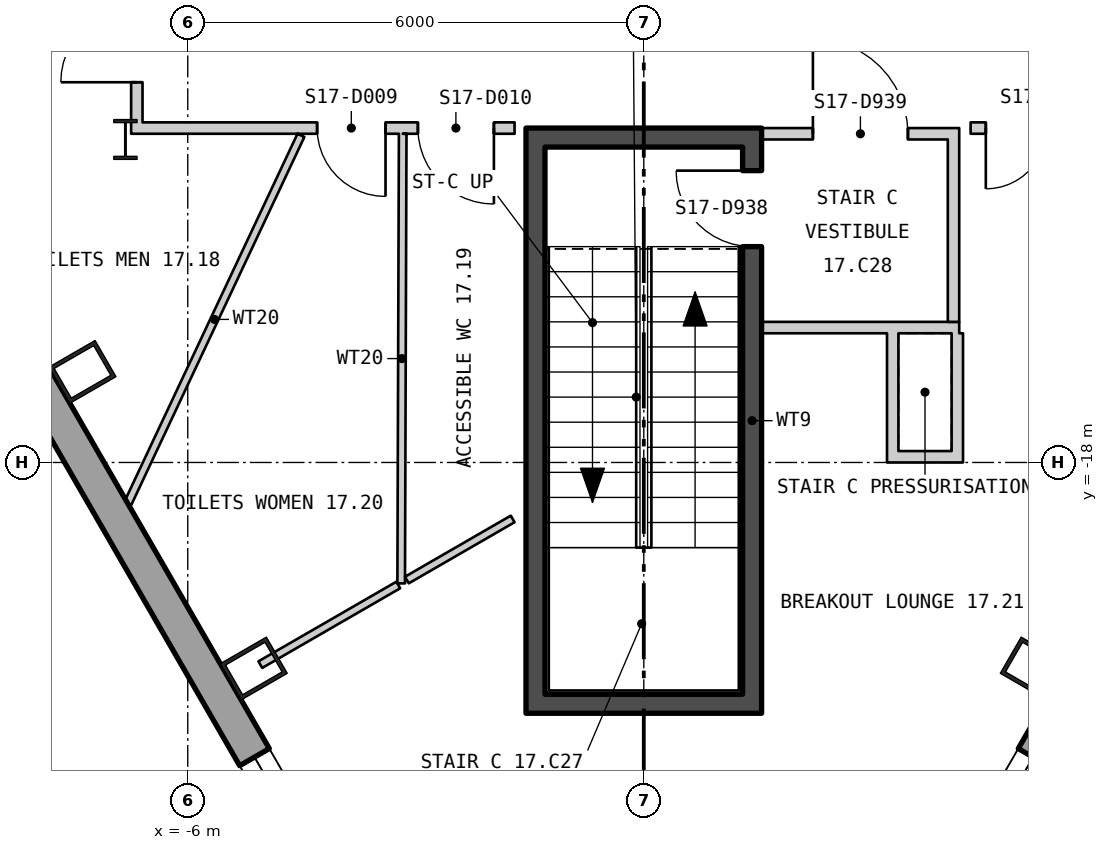
"""IFC4 building model, lengths in metres.
Left out: names, types, materials, properties, quantities, classifications, styles, units other than length and angle.
Written with IfcOpenShell. Run it as: python <this file> out.ifc"""

import sys

from ifc_helpers import new_model, si_unit, direction, frame, frame_2d, origin, origin_2d, place, context, subcontext, project, spatial, polyline, rectangle, hollow_rectangle, i_section, outline, extrude, element, fill, save


model = new_model("IFC4")
c1 = context("Model", 3, precision=1e-05, world=origin(), true_north=direction((0.0, 1.0)))
c2 = subcontext(c1, "Body", "Model", "MODEL_VIEW")
j1 = project(units=[si_unit("LENGTHUNIT", "METRE"), si_unit("PLANEANGLEUNIT", "RADIAN")], contexts=[c1])
p1 = place(None, origin())
s1 = spatial("IfcSite", under=j1, at=p1, CompositionType="ELEMENT")
p2 = place(p1, origin())
s2 = spatial("IfcBuilding", under=s1, at=p2, CompositionType="ELEMENT")
p3 = place(p2, frame((0.0, 0.0, 227.7)))
s3 = spatial("IfcBuildingStorey", under=s2, at=p3, CompositionType="ELEMENT", Elevation=227.7)
for number, where, z_axis, x_axis in (
    (1, (-7.385, -16.808, 0.0), (0.0, 0.0, 1.0), (0.5, -0.866, 0.0)),
    (2, (-5.131, -20.711, 0.0), (0.0, 0.0, 1.0), (0.5, -0.866, 0.0)),
    (3, (5.131, -20.711, 0.0), (0.0, 0.0, 1.0), (0.5, 0.866, 0.0)),
):
    element("IfcColumn", number, at=place(p3, frame(where, z_axis=z_axis, x_axis=x_axis)), inside=s3, PredefinedType="COLUMN", context=c2, shape_type="SweptSolid", body=[
        extrude(hollow_rectangle(XDim=0.55, YDim=0.7, WallThickness=0.05, at=origin_2d()), origin(), (0.0, 0.0, 1.0), 3.9),
    ])
p4 = place(p3, frame((-6.82, -13.75, 0.0), z_axis=(0.0, 0.0, 1.0), x_axis=(1.0, 0.0, 0.0)))
e4 = element("IfcColumn", 4, at=p4, inside=s3, PredefinedType="COLUMN", context=c2, shape_type="SweptSolid", body=[
    extrude(i_section(OverallWidth=0.306, OverallDepth=0.524, WebThickness=0.021, FlangeThickness=0.04, at=origin_2d()), origin(), (0.0, 0.0, 1.0), 3.9),
])
p5 = place(p3, frame((-26.075, 14.415, -0.18), z_axis=(0.0, 0.0, 1.0), x_axis=(0.499999194392, -0.866025868902, 0.0)))
e5 = element("IfcWall", 5, at=p5, inside=s3, PredefinedType="SOLIDWALL", context=c2, shape_type="SweptSolid", body=[
    extrude(outline(polyline([(-0.13, -0.225), (45.86, -0.225), (45.6, 0.225), (0.13, 0.225), (-0.13, -0.225)])), origin(), (0.0, 0.0, 1.0), 3.68),
])
p6 = place(p5, frame((1.424, 0.0, 1.08)))
e6 = element("IfcOpeningElement", 6, at=p6, cuts=e5, PredefinedType="OPENING", context=c2, shape_type="SweptSolid", body=[
    extrude(rectangle(XDim=2.4, YDim=2.0, at=frame_2d((1.2, 1.0))), frame((0.0, 0.235, 0.0), z_axis=(0.0, -1.0, 0.0), x_axis=(1.0, 0.0, 0.0)), (0.0, 0.0, 1.0), 0.47),
])
p7 = place(p5, frame((5.892, 0.0, 1.08)))
e7 = element("IfcOpeningElement", 7, at=p7, cuts=e5, PredefinedType="OPENING", context=c2, shape_type="SweptSolid", body=[
    extrude(rectangle(XDim=2.4, YDim=2.0, at=frame_2d((1.2, 1.0))), frame((0.0, 0.235, 0.0), z_axis=(0.0, -1.0, 0.0), x_axis=(1.0, 0.0, 0.0)), (0.0, 0.0, 1.0), 0.47),
])
p8 = place(p5, frame((10.399, 0.0, 1.08)))
e8 = element("IfcOpeningElement", 8, at=p8, cuts=e5, PredefinedType="OPENING", context=c2, shape_type="SweptSolid", body=[
    extrude(rectangle(XDim=2.4, YDim=2.0, at=frame_2d((1.2, 1.0))), frame((0.0, 0.235, 0.0), z_axis=(0.0, -1.0, 0.0), x_axis=(1.0, 0.0, 0.0)), (0.0, 0.0, 1.0), 0.47),
])
p9 = place(p5, frame((19.412, 0.0, 1.08)))
e9 = element("IfcOpeningElement", 9, at=p9, cuts=e5, PredefinedType="OPENING", context=c2, shape_type="SweptSolid", body=[
    extrude(rectangle(XDim=2.4, YDim=2.0, at=frame_2d((1.2, 1.0))), frame((0.0, 0.235, 0.0), z_axis=(0.0, -1.0, 0.0), x_axis=(1.0, 0.0, 0.0)), (0.0, 0.0, 1.0), 0.47),
])
p10 = place(p5, frame((23.918, 0.0, 1.08)))
e10 = element("IfcOpeningElement", 10, at=p10, cuts=e5, PredefinedType="OPENING", context=c2, shape_type="SweptSolid", body=[
    extrude(rectangle(XDim=2.4, YDim=2.0, at=frame_2d((1.2, 1.0))), frame((0.0, 0.235, 0.0), z_axis=(0.0, -1.0, 0.0), x_axis=(1.0, 0.0, 0.0)), (0.0, 0.0, 1.0), 0.47),
])
p11 = place(p5, frame((28.425, 0.0, 1.08)))
e11 = element("IfcOpeningElement", 11, at=p11, cuts=e5, PredefinedType="OPENING", context=c2, shape_type="SweptSolid", body=[
    extrude(rectangle(XDim=2.4, YDim=2.0, at=frame_2d((1.2, 1.0))), frame((0.0, 0.235, 0.0), z_axis=(0.0, -1.0, 0.0), x_axis=(1.0, 0.0, 0.0)), (0.0, 0.0, 1.0), 0.47),
])
p12 = place(p5, frame((32.932, 0.0, 1.08)))
e12 = element("IfcOpeningElement", 12, at=p12, cuts=e5, PredefinedType="OPENING", context=c2, shape_type="SweptSolid", body=[
    extrude(rectangle(XDim=2.4, YDim=2.0, at=frame_2d((1.2, 1.0))), frame((0.0, 0.235, 0.0), z_axis=(0.0, -1.0, 0.0), x_axis=(1.0, 0.0, 0.0)), (0.0, 0.0, 1.0), 0.47),
])
p13 = place(p5, frame((41.907, 0.0, 1.08)))
e13 = element("IfcOpeningElement", 13, at=p13, cuts=e5, PredefinedType="OPENING", context=c2, shape_type="SweptSolid", body=[
    extrude(rectangle(XDim=2.4, YDim=2.0, at=frame_2d((1.2, 1.0))), frame((0.0, 0.235, 0.0), z_axis=(0.0, -1.0, 0.0), x_axis=(1.0, 0.0, 0.0)), (0.0, 0.0, 1.0), 0.47),
])
p14 = place(p3, frame((3.21, -25.189, -0.18), z_axis=(0.0, 0.0, 1.0), x_axis=(0.499999194392, 0.866025868902, 0.0)))
e14 = element("IfcWall", 14, at=p14, inside=s3, PredefinedType="SOLIDWALL", context=c2, shape_type="SweptSolid", body=[
    extrude(outline(polyline([(-0.13, -0.225), (45.86, -0.225), (45.6, 0.225), (0.13, 0.225), (-0.13, -0.225)])), origin(), (0.0, 0.0, 1.0), 3.68),
])
p15 = place(p14, frame((1.424, 0.0, 1.08)))
e15 = element("IfcOpeningElement", 15, at=p15, cuts=e14, PredefinedType="OPENING", context=c2, shape_type="SweptSolid", body=[
    extrude(rectangle(XDim=2.4, YDim=2.0, at=frame_2d((1.2, 1.0))), frame((0.0, 0.235, 0.0), z_axis=(0.0, -1.0, 0.0), x_axis=(1.0, 0.0, 0.0)), (0.0, 0.0, 1.0), 0.47),
])
p16 = place(p14, frame((5.892, 0.0, 1.08)))
e16 = element("IfcOpeningElement", 16, at=p16, cuts=e14, PredefinedType="OPENING", context=c2, shape_type="SweptSolid", body=[
    extrude(rectangle(XDim=2.4, YDim=2.0, at=frame_2d((1.2, 1.0))), frame((0.0, 0.235, 0.0), z_axis=(0.0, -1.0, 0.0), x_axis=(1.0, 0.0, 0.0)), (0.0, 0.0, 1.0), 0.47),
])
p17 = place(p14, frame((10.399, 0.0, 1.08)))
e17 = element("IfcOpeningElement", 17, at=p17, cuts=e14, PredefinedType="OPENING", context=c2, shape_type="SweptSolid", body=[
    extrude(rectangle(XDim=2.4, YDim=2.0, at=frame_2d((1.2, 1.0))), frame((0.0, 0.235, 0.0), z_axis=(0.0, -1.0, 0.0), x_axis=(1.0, 0.0, 0.0)), (0.0, 0.0, 1.0), 0.47),
])
p18 = place(p14, frame((14.905, 0.0, 1.08)))
e18 = element("IfcOpeningElement", 18, at=p18, cuts=e14, PredefinedType="OPENING", context=c2, shape_type="SweptSolid", body=[
    extrude(rectangle(XDim=2.4, YDim=2.0, at=frame_2d((1.2, 1.0))), frame((0.0, 0.235, 0.0), z_axis=(0.0, -1.0, 0.0), x_axis=(1.0, 0.0, 0.0)), (0.0, 0.0, 1.0), 0.47),
])
p19 = place(p14, frame((19.412, 0.0, 1.08)))
e19 = element("IfcOpeningElement", 19, at=p19, cuts=e14, PredefinedType="OPENING", context=c2, shape_type="SweptSolid", body=[
    extrude(rectangle(XDim=2.4, YDim=2.0, at=frame_2d((1.2, 1.0))), frame((0.0, 0.235, 0.0), z_axis=(0.0, -1.0, 0.0), x_axis=(1.0, 0.0, 0.0)), (0.0, 0.0, 1.0), 0.47),
])
p20 = place(p14, frame((23.918, 0.0, 1.08)))
e20 = element("IfcOpeningElement", 20, at=p20, cuts=e14, PredefinedType="OPENING", context=c2, shape_type="SweptSolid", body=[
    extrude(rectangle(XDim=2.4, YDim=2.0, at=frame_2d((1.2, 1.0))), frame((0.0, 0.235, 0.0), z_axis=(0.0, -1.0, 0.0), x_axis=(1.0, 0.0, 0.0)), (0.0, 0.0, 1.0), 0.47),
])
p21 = place(p14, frame((32.932, 0.0, 1.08)))
e21 = element("IfcOpeningElement", 21, at=p21, cuts=e14, PredefinedType="OPENING", context=c2, shape_type="SweptSolid", body=[
    extrude(rectangle(XDim=2.4, YDim=2.0, at=frame_2d((1.2, 1.0))), frame((0.0, 0.235, 0.0), z_axis=(0.0, -1.0, 0.0), x_axis=(1.0, 0.0, 0.0)), (0.0, 0.0, 1.0), 0.47),
])
p22 = place(p14, frame((37.438, 0.0, 1.08)))
e22 = element("IfcOpeningElement", 22, at=p22, cuts=e14, PredefinedType="OPENING", context=c2, shape_type="SweptSolid", body=[
    extrude(rectangle(XDim=2.4, YDim=2.0, at=frame_2d((1.2, 1.0))), frame((0.0, 0.235, 0.0), z_axis=(0.0, -1.0, 0.0), x_axis=(1.0, 0.0, 0.0)), (0.0, 0.0, 1.0), 0.47),
])
p23 = place(p14, frame((41.907, 0.0, 1.08)))
e23 = element("IfcOpeningElement", 23, at=p23, cuts=e14, PredefinedType="OPENING", context=c2, shape_type="SweptSolid", body=[
    extrude(rectangle(XDim=2.4, YDim=2.0, at=frame_2d((1.2, 1.0))), frame((0.0, 0.235, 0.0), z_axis=(0.0, -1.0, 0.0), x_axis=(1.0, 0.0, 0.0)), (0.0, 0.0, 1.0), 0.47),
])
p24 = place(p3, frame((-1.425, -21.05, 0.0), z_axis=(0.0, 0.0, 1.0), x_axis=(0.0, 1.0, 0.0)))
e24 = element("IfcWall", 24, at=p24, inside=s3, PredefinedType="SHEAR", context=c2, shape_type="SweptSolid", body=[
    extrude(rectangle(XDim=7.2, YDim=0.25, at=frame_2d((3.6, 0.0))), origin(), (0.0, 0.0, 1.0), 3.7),
])
p25 = place(p3, frame((1.425, -21.05, 0.0), z_axis=(0.0, 0.0, 1.0), x_axis=(0.0, 1.0, 0.0)))
e25 = element("IfcWall", 25, at=p25, inside=s3, PredefinedType="SHEAR", context=c2, shape_type="SweptSolid", body=[
    extrude(rectangle(XDim=7.2, YDim=0.25, at=frame_2d((3.6, 0.0))), origin(), (0.0, 0.0, 1.0), 3.7),
])
p26 = place(p25, frame((5.89, 0.0, 0.0)))
e26 = element("IfcOpeningElement", 26, at=p26, cuts=e25, PredefinedType="OPENING", context=c2, shape_type="SweptSolid", body=[
    extrude(rectangle(XDim=1.0, YDim=2.1, at=frame_2d((0.5, 1.05))), frame((0.0, 0.135, 0.0), z_axis=(0.0, -1.0, 0.0), x_axis=(1.0, 0.0, 0.0)), (0.0, 0.0, 1.0), 0.27),
])
for number, where, z_axis, x_axis in (
    (27, (-1.55, -21.175, 0.0), (0.0, 0.0, 1.0), (1.0, 0.0, 0.0)),
    (28, (-1.55, -13.725, 0.0), (0.0, 0.0, 1.0), (1.0, 0.0, 0.0)),
):
    element("IfcWall", number, at=place(p3, frame(where, z_axis=z_axis, x_axis=x_axis)), inside=s3, PredefinedType="SHEAR", context=c2, shape_type="SweptSolid", body=[
        extrude(rectangle(XDim=3.1, YDim=0.25, at=frame_2d((1.55, 0.0))), origin(), (0.0, 0.0, 1.0), 3.7),
    ])
p27 = place(p3, frame((1.55, -16.225, 0.0), z_axis=(0.0, 0.0, 1.0), x_axis=(1.0, 0.0, 0.0)))
e29 = element("IfcWall", 29, at=p27, inside=s3, PredefinedType="PARTITIONING", context=c2, shape_type="SweptSolid", body=[
    extrude(rectangle(XDim=2.6, YDim=0.15, at=frame_2d((1.3, 0.0))), origin(), (0.0, 0.0, 1.0), 3.7),
])
p28 = place(p3, frame((4.075, -16.15, 0.0), z_axis=(0.0, 0.0, 1.0), x_axis=(0.0, 1.0, 0.0)))
e30 = element("IfcWall", 30, at=p28, inside=s3, PredefinedType="PARTITIONING", context=c2, shape_type="SweptSolid", body=[
    extrude(rectangle(XDim=2.4, YDim=0.15, at=frame_2d((1.2, 0.0))), origin(), (0.0, 0.0, 1.0), 3.7),
])
p29 = place(p3, frame((1.55, -13.675, 0.0), z_axis=(0.0, 0.0, 1.0), x_axis=(1.0, 0.0, 0.0)))
e31 = element("IfcWall", 31, at=p29, inside=s3, PredefinedType="PARTITIONING", context=c2, shape_type="SweptSolid", body=[
    extrude(rectangle(XDim=2.6, YDim=0.15, at=frame_2d((1.3, 0.0))), origin(), (0.0, 0.0, 1.0), 2.91),
])
p30 = place(p29, frame((0.675, 0.0, 0.0)))
e32 = element("IfcOpeningElement", 32, at=p30, cuts=e31, PredefinedType="OPENING", context=c2, shape_type="SweptSolid", body=[
    extrude(rectangle(XDim=1.25, YDim=2.1, at=frame_2d((0.625, 1.05))), frame((0.0, 0.085, 0.0), z_axis=(0.0, -1.0, 0.0), x_axis=(1.0, 0.0, 0.0)), (0.0, 0.0, 1.0), 0.17),
])
p31 = place(p3, frame((3.275, -18.0, 0.0), z_axis=(0.0, 0.0, 1.0), x_axis=(0.0, 1.0, 0.0)))
e33 = element("IfcWall", 33, at=p31, inside=s3, PredefinedType="PARTITIONING", context=c2, shape_type="SweptSolid", body=[
    extrude(rectangle(XDim=1.7, YDim=0.15, at=frame_2d((0.85, 0.0))), origin(), (0.0, 0.0, 1.0), 3.01),
])
p32 = place(p3, frame((3.35, -17.925, 0.0), z_axis=(0.0, 0.0, 1.0), x_axis=(1.0, 0.0, 0.0)))
e34 = element("IfcWall", 34, at=p32, inside=s3, PredefinedType="PARTITIONING", context=c2, shape_type="SweptSolid", body=[
    extrude(rectangle(XDim=0.7, YDim=0.15, at=frame_2d((0.35, 0.0))), origin(), (0.0, 0.0, 1.0), 3.7),
])
p33 = place(p3, frame((4.125, -18.0, 0.0), z_axis=(0.0, 0.0, 1.0), x_axis=(0.0, 1.0, 0.0)))
e35 = element("IfcWall", 35, at=p33, inside=s3, PredefinedType="PARTITIONING", context=c2, shape_type="SweptSolid", body=[
    extrude(rectangle(XDim=1.7, YDim=0.15, at=frame_2d((0.85, 0.0))), origin(), (0.0, 0.0, 1.0), 3.7),
])
p34 = place(p3, frame((-9.552, -12.854, 0.0), z_axis=(0.0, 0.0, 1.0), x_axis=(0.865847012661, 0.500308855275, 0.0)))
e36 = element("IfcWall", 36, at=p34, inside=s3, PredefinedType="PARTITIONING", context=c2, shape_type="SweptSolid", body=[
    extrude(rectangle(XDim=3.198, YDim=0.15, at=frame_2d((1.599, 0.0))), origin(), (0.0, 0.0, 1.0), 3.7),
])
p35 = place(p3, frame((-6.789, -18.539, 0.0), z_axis=(0.0, 0.0, 1.0), x_axis=(0.425635061069, 0.904894908146, 0.0)))
e37 = element("IfcWall", 37, at=p35, inside=s3, PredefinedType="PARTITIONING", context=c2, shape_type="SweptSolid", body=[
    extrude(rectangle(XDim=5.352, YDim=0.1, at=frame_2d((2.676, 0.0))), origin(), (0.0, 0.0, 1.0), 3.7),
])
p36 = place(p3, frame((-6.67, -13.675, 0.0), z_axis=(0.0, 0.0, 1.0), x_axis=(0.0, 1.0, 0.0)))
e38 = element("IfcWall", 38, at=p36, inside=s3, PredefinedType="PARTITIONING", context=c2, shape_type="SweptSolid", body=[
    extrude(rectangle(XDim=10.263, YDim=0.15, at=frame_2d((5.131, 0.0))), origin(), (0.0, 0.0, 1.0), 3.11),
])
p37 = place(p36, frame((0.678, 0.0, 0.0)))
e39 = element("IfcOpeningElement", 39, at=p37, cuts=e38, PredefinedType="OPENING", context=c2, shape_type="SweptSolid", body=[
    extrude(rectangle(XDim=1.0, YDim=2.1, at=frame_2d((0.5, 1.05))), frame((0.0, 0.085, 0.0), z_axis=(0.0, -1.0, 0.0), x_axis=(1.0, 0.0, 0.0)), (0.0, 0.0, 1.0), 0.17),
])
p38 = place(p36, frame((2.685, 0.0, 0.0)))
e40 = element("IfcOpeningElement", 40, at=p38, cuts=e38, PredefinedType="OPENING", context=c2, shape_type="SweptSolid", body=[
    extrude(rectangle(XDim=1.0, YDim=2.1, at=frame_2d((0.5, 1.05))), frame((0.0, 0.085, 0.0), z_axis=(0.0, -1.0, 0.0), x_axis=(1.0, 0.0, 0.0)), (0.0, 0.0, 1.0), 0.17),
])
p39 = place(p3, frame((-6.595, -13.6, 0.0), z_axis=(0.0, 0.0, 1.0), x_axis=(1.0, 0.0, 0.0)))
e41 = element("IfcWall", 41, at=p39, inside=s3, PredefinedType="PARTITIONING", context=c2, shape_type="SweptSolid", body=[
    extrude(rectangle(XDim=4.895, YDim=0.15, at=frame_2d((2.447, 0.0))), origin(), (0.0, 0.0, 1.0), 2.91),
])
p40 = place(p39, frame((2.297, 0.0, 0.0)))
e42 = element("IfcOpeningElement", 42, at=p40, cuts=e41, PredefinedType="OPENING", context=c2, shape_type="SweptSolid", body=[
    extrude(rectangle(XDim=0.9, YDim=2.1, at=frame_2d((0.45, 1.05))), frame((0.0, 0.085, 0.0), z_axis=(0.0, -1.0, 0.0), x_axis=(1.0, 0.0, 0.0)), (0.0, 0.0, 1.0), 0.17),
])
p41 = place(p39, frame((3.623, 0.0, 0.0)))
e43 = element("IfcOpeningElement", 43, at=p41, cuts=e41, PredefinedType="OPENING", context=c2, shape_type="SweptSolid", body=[
    extrude(rectangle(XDim=1.0, YDim=2.1, at=frame_2d((0.5, 1.05))), frame((0.0, 0.085, 0.0), z_axis=(0.0, -1.0, 0.0), x_axis=(1.0, 0.0, 0.0)), (0.0, 0.0, 1.0), 0.17),
])
p42 = place(p3, frame((-5.045, -20.66, 0.0), z_axis=(0.0, 0.0, 1.0), x_axis=(0.866002828817, 0.500039098953, 0.0)))
e44 = element("IfcWall", 44, at=p42, inside=s3, PredefinedType="PARTITIONING", context=c2, shape_type="SweptSolid", body=[
    extrude(rectangle(XDim=2.096, YDim=0.1, at=frame_2d((1.048, 0.0))), origin(), (0.0, 0.0, 1.0), 3.7),
])
p43 = place(p3, frame((-3.192, -19.591, 0.0), z_axis=(0.0, 0.0, 1.0), x_axis=(0.003380643291, 0.999994285609, 0.0)))
e45 = element("IfcWall", 45, at=p43, inside=s3, PredefinedType="PARTITIONING", context=c2, shape_type="SweptSolid", body=[
    extrude(rectangle(XDim=5.916, YDim=0.1, at=frame_2d((2.958, 0.0))), origin(), (0.0, 0.0, 1.0), 3.01),
])
p44 = place(p3, frame((-3.117, -19.547, 0.0), z_axis=(0.0, 0.0, 1.0), x_axis=(0.865936922628, 0.500153222552, 0.0)))
e46 = element("IfcWall", 46, at=p44, inside=s3, PredefinedType="PARTITIONING", context=c2, shape_type="SweptSolid", body=[
    extrude(rectangle(XDim=1.607, YDim=0.1, at=frame_2d((0.804, 0.0))), origin(), (0.0, 0.0, 1.0), 3.7),
])
p45 = place(p3, frame((4.3, -13.6, 0.0), z_axis=(0.0, 0.0, 1.0), x_axis=(1.0, 0.0, 0.0)))
e47 = element("IfcWall", 47, at=p45, inside=s3, PredefinedType="PARTITIONING", context=c2, shape_type="SweptSolid", body=[
    extrude(rectangle(XDim=2.445, YDim=0.15, at=frame_2d((1.222, 0.0))), origin(), (0.0, 0.0, 1.0), 2.91),
])
p46 = place(p45, frame((0.2, 0.0, 0.0)))
e48 = element("IfcOpeningElement", 48, at=p46, cuts=e47, PredefinedType="OPENING", context=c2, shape_type="SweptSolid", body=[
    extrude(rectangle(XDim=1.6, YDim=2.1, at=frame_2d((0.8, 1.05))), frame((0.0, 0.085, 0.0), z_axis=(0.0, -1.0, 0.0), x_axis=(1.0, 0.0, 0.0)), (0.0, 0.0, 1.0), 0.17),
])
p47 = place(p3, frame((4.827, -10.127, 0.0), z_axis=(0.0, 0.0, 1.0), x_axis=(0.866103179807, -0.499865263774, 0.0)))
e49 = element("IfcWall", 49, at=p47, inside=s3, PredefinedType="PARTITIONING", context=c2, shape_type="SweptSolid", body=[
    extrude(rectangle(XDim=5.455, YDim=0.15, at=frame_2d((2.728, 0.0))), origin(), (0.0, 0.0, 1.0), 3.7),
])
p48 = place(p13, origin())
e50 = element("IfcWindow", 50, at=p48, inside=s3, PartitioningType="SINGLE_PANEL", PredefinedType="WINDOW", context=c2, shape_type="SweptSolid", body=[
    extrude(rectangle(XDim=2.4, YDim=2.0, at=frame_2d((1.2, 1.0))), frame((0.0, 0.105, 0.0), z_axis=(0.0, -1.0, 0.0), x_axis=(1.0, 0.0, 0.0)), (0.0, 0.0, 1.0), 0.06),
])
fill(e13, e50)
p49 = place(p15, origin())
e51 = element("IfcWindow", 51, at=p49, inside=s3, PartitioningType="SINGLE_PANEL", PredefinedType="WINDOW", context=c2, shape_type="SweptSolid", body=[
    extrude(rectangle(XDim=2.4, YDim=2.0, at=frame_2d((1.2, 1.0))), frame((0.0, 0.105, 0.0), z_axis=(0.0, -1.0, 0.0), x_axis=(1.0, 0.0, 0.0)), (0.0, 0.0, 1.0), 0.06),
])
fill(e15, e51)
p50 = place(p26, origin())
e52 = element("IfcDoor", 52, at=p50, inside=s3, OperationType="SINGLE_SWING_LEFT", PredefinedType="DOOR", context=c2, shape_type="SweptSolid", body=[
    extrude(rectangle(XDim=1.0, YDim=2.1, at=frame_2d((0.5, 1.05))), frame((0.0, 0.025, 0.0), z_axis=(0.0, -1.0, 0.0), x_axis=(1.0, 0.0, 0.0)), (0.0, 0.0, 1.0), 0.05),
])
fill(e26, e52)
p51 = place(p30, origin())
e53 = element("IfcDoor", 53, at=p51, inside=s3, OperationType="SINGLE_SWING_RIGHT", PredefinedType="DOOR", context=c2, shape_type="SweptSolid", body=[
    extrude(rectangle(XDim=1.25, YDim=2.1, at=frame_2d((0.625, 1.05))), frame((0.0, 0.025, 0.0), z_axis=(0.0, -1.0, 0.0), x_axis=(1.0, 0.0, 0.0)), (0.0, 0.0, 1.0), 0.05),
])
fill(e32, e53)
p52 = place(p37, origin())
e54 = element("IfcDoor", 54, at=p52, inside=s3, OperationType="SINGLE_SWING_RIGHT", PredefinedType="DOOR", context=c2, shape_type="SweptSolid", body=[
    extrude(rectangle(XDim=1.0, YDim=2.1, at=frame_2d((0.5, 1.05))), frame((0.0, 0.025, 0.0), z_axis=(0.0, -1.0, 0.0), x_axis=(1.0, 0.0, 0.0)), (0.0, 0.0, 1.0), 0.05),
])
fill(e39, e54)
p53 = place(p40, origin())
e55 = element("IfcDoor", 55, at=p53, inside=s3, OperationType="SINGLE_SWING_RIGHT", PredefinedType="DOOR", context=c2, shape_type="SweptSolid", body=[
    extrude(rectangle(XDim=0.9, YDim=2.1, at=frame_2d((0.45, 1.05))), frame((0.0, 0.025, 0.0), z_axis=(0.0, -1.0, 0.0), x_axis=(1.0, 0.0, 0.0)), (0.0, 0.0, 1.0), 0.05),
])
fill(e42, e55)
p54 = place(p41, origin())
e56 = element("IfcDoor", 56, at=p54, inside=s3, OperationType="SINGLE_SWING_RIGHT", PredefinedType="DOOR", context=c2, shape_type="SweptSolid", body=[
    extrude(rectangle(XDim=1.0, YDim=2.1, at=frame_2d((0.5, 1.05))), frame((0.0, 0.025, 0.0), z_axis=(0.0, -1.0, 0.0), x_axis=(1.0, 0.0, 0.0)), (0.0, 0.0, 1.0), 0.05),
])
fill(e43, e56)
p55 = place(p46, origin())
e57 = element("IfcDoor", 57, at=p55, inside=s3, OperationType="DOUBLE_DOOR_SINGLE_SWING", PredefinedType="DOOR", context=c2, shape_type="SweptSolid", body=[
    extrude(rectangle(XDim=1.6, YDim=2.1, at=frame_2d((0.8, 1.05))), frame((0.0, 0.025, 0.0), z_axis=(0.0, -1.0, 0.0), x_axis=(1.0, 0.0, 0.0)), (0.0, 0.0, 1.0), 0.05),
])
fill(e48, e57)
save(model, sys.argv[1])
